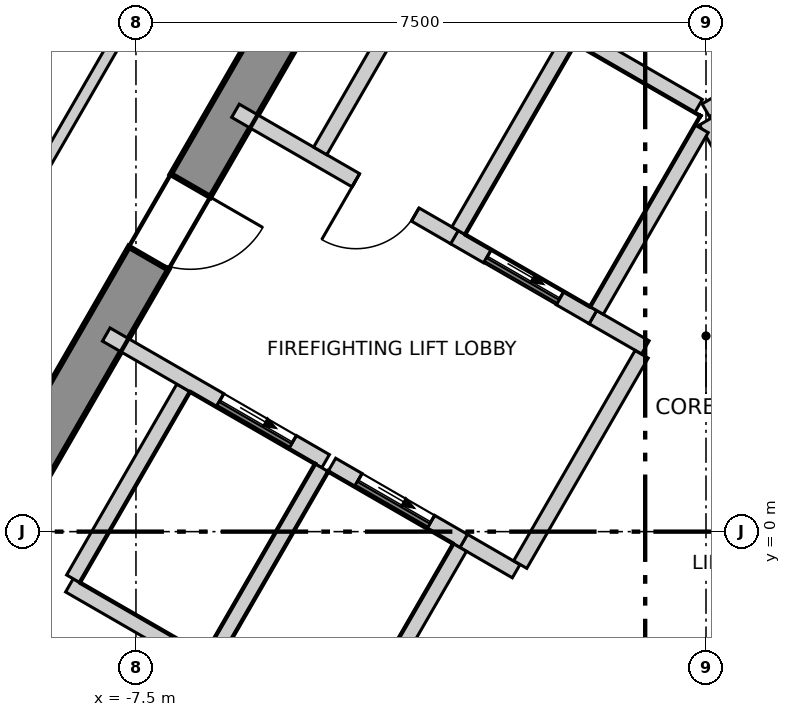
"""IFC4 building model, lengths in metres.
Left out: names, types, materials, properties, quantities, classifications, styles, units other than length and angle.
Written with IfcOpenShell. Run it as: python <this file> out.ifc"""

import sys

from ifc_helpers import new_model, si_unit, direction, frame, frame_2d, origin, place, context, subcontext, project, spatial, polyline, rectangle, outline, extrude, element, fill, save


model = new_model("IFC4")
c1 = context("Model", 3, precision=1e-05, world=origin(), true_north=direction((0.0, 1.0)))
c2 = subcontext(c1, "Body", "Model", "MODEL_VIEW")
j1 = project(units=[si_unit("LENGTHUNIT", "METRE"), si_unit("PLANEANGLEUNIT", "RADIAN")], contexts=[c1])
p1 = place(None, origin())
s1 = spatial("IfcSite", under=j1, at=p1, CompositionType="ELEMENT")
p2 = place(p1, origin())
s2 = spatial("IfcBuilding", under=s1, at=p2, CompositionType="ELEMENT")
p3 = place(p2, frame((0.0, 0.0, 261.8)))
s3 = spatial("IfcBuildingStorey", under=s2, at=p3, CompositionType="ELEMENT", Elevation=261.8)
p4 = place(p3, frame((-1.732, 13.3, -0.3), z_axis=(0.0, 0.0, 1.0), x_axis=(-0.500000539815, -0.866025092122, 0.0)))
e1 = element("IfcWall", 1, at=p4, inside=s3, PredefinedType="SHEAR", context=c2, shape_type="SweptSolid", body=[
    extrude(outline(polyline([(-0.173, -0.3), (1.795, -0.3), (3.763, -0.3), (5.732, -0.3), (7.7, -0.3), (9.668, -0.301), (11.637, -0.301), (13.605, -0.301), (15.573, -0.301), (17.542, -0.301), (19.51, -0.301), (21.478, -0.301), (21.131, 0.3), (19.226, 0.3), (17.321, 0.3), (15.415, 0.3), (13.51, 0.3), (11.605, 0.3), (9.699, 0.3), (7.794, 0.3), (5.889, 0.3), (3.984, 0.3), (2.078, 0.3), (0.173, 0.3), (-0.173, -0.3)])), origin(), (0.0, 0.0, 1.0), 6.5),
])
p5 = place(p4, frame((10.102, 0.0, 0.3)))
e2 = element("IfcOpeningElement", 2, at=p5, cuts=e1, PredefinedType="OPENING", context=c2, shape_type="SweptSolid", body=[
    extrude(rectangle(XDim=1.1, YDim=2.1, at=frame_2d((0.55, 1.05))), frame((0.0, 0.31, 0.0), z_axis=(0.0, -1.0, 0.0), x_axis=(1.0, 0.0, 0.0)), (0.0, 0.0, 1.0), 0.621),
])
p6 = place(p4, frame((16.248, 0.0, 0.3)))
e3 = element("IfcOpeningElement", 3, at=p6, cuts=e1, PredefinedType="OPENING", context=c2, shape_type="SweptSolid", body=[
    extrude(rectangle(XDim=0.9, YDim=2.1, at=frame_2d((0.45, 1.05))), frame((0.0, 0.31, 0.0), z_axis=(0.0, -1.0, 0.0), x_axis=(1.0, 0.0, 0.0)), (0.0, 0.0, 1.0), 0.621),
])
p7 = place(p3, frame((-14.463, -5.15, 0.0), z_axis=(0.0, 0.0, 1.0), x_axis=(0.500017691629, 0.866015189277, 0.0)))
e4 = element("IfcWall", 4, at=p7, inside=s3, PredefinedType="PARTITIONING", context=c2, shape_type="SweptSolid", body=[
    extrude(rectangle(XDim=23.383, YDim=0.15, at=frame_2d((11.691, 0.0))), origin(), (0.0, 0.0, 1.0), 6.2),
])
p8 = place(p7, frame((17.037, 0.0, 0.0)))
e5 = element("IfcOpeningElement", 5, at=p8, cuts=e4, PredefinedType="OPENING", context=c2, shape_type="SweptSolid", body=[
    extrude(rectangle(XDim=1.0, YDim=2.1, at=frame_2d((0.5, 1.05))), frame((0.0, 0.085, 0.0), z_axis=(0.0, -1.0, 0.0), x_axis=(1.0, 0.0, 0.0)), (0.0, 0.0, 1.0), 0.17),
])
p9 = place(p7, frame((5.346, 0.0, 0.0)))
e6 = element("IfcOpeningElement", 6, at=p9, cuts=e4, PredefinedType="OPENING", context=c2, shape_type="SweptSolid", body=[
    extrude(rectangle(XDim=1.0, YDim=2.1, at=frame_2d((0.5, 1.05))), frame((0.0, 0.085, 0.0), z_axis=(0.0, -1.0, 0.0), x_axis=(1.0, 0.0, 0.0)), (0.0, 0.0, 1.0), 0.17),
])
p10 = place(p3, frame((-19.571, -8.798, 0.0), z_axis=(0.0, 0.0, 1.0), x_axis=(0.500014166641, 0.866017224516, 0.0)))
e7 = element("IfcWall", 7, at=p10, inside=s3, PredefinedType="PARTITIONING", context=c2, shape_type="SweptSolid", body=[
    extrude(rectangle(XDim=34.991, YDim=0.15, at=frame_2d((17.496, 0.0))), origin(), (0.0, 0.0, 1.0), 6.2),
])
p11 = place(p3, frame((-23.25, -10.317, 0.0), z_axis=(0.0, 0.0, 1.0), x_axis=(0.500024875003, 0.866011041719, 0.0)))
e8 = element("IfcWall", 8, at=p11, inside=s3, PredefinedType="PARTITIONING", context=c2, shape_type="SweptSolid", body=[
    extrude(rectangle(XDim=41.206, YDim=0.15, at=frame_2d((20.603, 0.0))), origin(), (0.0, 0.0, 1.0), 6.2),
])
p12 = place(p3, frame((-8.376, -0.707, 0.0), z_axis=(0.0, 0.0, 1.0), x_axis=(0.866072678707, -0.499918108492, 0.0)))
e9 = element("IfcWall", 9, at=p12, inside=s3, PredefinedType="SOLIDWALL", context=c2, shape_type="SweptSolid", body=[
    extrude(rectangle(XDim=1.98, YDim=0.2, at=frame_2d((0.99, 0.0))), origin(), (0.0, 0.0, 1.0), 6.2),
])
p13 = place(p3, frame((-8.326, -0.62, 0.0), z_axis=(0.0, 0.0, 1.0), x_axis=(0.500023687443, 0.866011727401, 0.0)))
e10 = element("IfcWall", 10, at=p13, inside=s3, PredefinedType="SOLIDWALL", context=c2, shape_type="SweptSolid", body=[
    extrude(rectangle(XDim=2.9, YDim=0.2, at=frame_2d((1.45, 0.0))), origin(), (0.0, 0.0, 1.0), 6.2),
])
p14 = place(p3, frame((-0.002, 5.541, 0.0), z_axis=(0.0, 0.0, 1.0), x_axis=(0.86600155993, 0.500041296494, 0.0)))
e11 = element("IfcWall", 11, at=p14, inside=s3, PredefinedType="SOLIDWALL", context=c2, shape_type="SweptSolid", body=[
    extrude(rectangle(XDim=4.132, YDim=0.2, at=frame_2d((2.066, 0.0))), origin(), (0.0, 0.0, 1.0), 6.2),
])
p15 = place(p3, frame((0.0, 5.4, 0.0), z_axis=(0.0, 0.0, 1.0), x_axis=(0.500103862429, -0.865965430478, 0.0)))
e12 = element("IfcWall", 12, at=p15, inside=s3, PredefinedType="SOLIDWALL", context=c2, shape_type="SweptSolid", body=[
    extrude(rectangle(XDim=2.973, YDim=0.2, at=frame_2d((1.487, 0.0))), origin(), (0.0, 0.0, 1.0), 6.2),
])
p16 = place(p15, frame((0.937, 0.0, 0.0)))
e13 = element("IfcOpeningElement", 13, at=p16, cuts=e12, PredefinedType="OPENING", context=c2, shape_type="SweptSolid", body=[
    extrude(rectangle(XDim=1.1, YDim=2.1, at=frame_2d((0.55, 1.05))), frame((0.0, 0.11, 0.0), z_axis=(0.0, -1.0, 0.0), x_axis=(1.0, 0.0, 0.0)), (0.0, 0.0, 1.0), 0.22),
])
p17 = place(p3, frame((-7.891, 2.593, 0.0), z_axis=(0.0, 0.0, 1.0), x_axis=(0.866070917804, -0.499921159118, 0.0)))
e14 = element("IfcWall", 14, at=p17, inside=s3, PredefinedType="SOLIDWALL", context=c2, shape_type="SweptSolid", body=[
    extrude(rectangle(XDim=3.333, YDim=0.2, at=frame_2d((1.666, 0.0))), origin(), (0.0, 0.0, 1.0), 6.2),
])
p18 = place(p17, frame((1.73, 0.0, 0.0)))
e15 = element("IfcOpeningElement", 15, at=p18, cuts=e14, PredefinedType="OPENING", context=c2, shape_type="SweptSolid", body=[
    extrude(rectangle(XDim=1.1, YDim=2.1, at=frame_2d((0.55, 1.05))), frame((0.0, 0.11, 0.0), z_axis=(0.0, -1.0, 0.0), x_axis=(1.0, 0.0, 0.0)), (0.0, 0.0, 1.0), 0.22),
])
p19 = place(p3, frame((-3.188, -0.122, 0.0), z_axis=(0.0, 0.0, 1.0), x_axis=(0.865705793592, -0.50055317294, 0.0)))
e16 = element("IfcWall", 16, at=p19, inside=s3, PredefinedType="SOLIDWALL", context=c2, shape_type="SweptSolid", body=[
    extrude(rectangle(XDim=0.797, YDim=0.2, at=frame_2d((0.398, 0.0))), origin(), (0.0, 0.0, 1.0), 6.2),
])
p20 = place(p3, frame((-6.191, 5.537, 0.0), z_axis=(0.0, 0.0, 1.0), x_axis=(0.866052607023, -0.499952879648, 0.0)))
e17 = element("IfcWall", 17, at=p20, inside=s3, PredefinedType="SOLIDWALL", context=c2, shape_type="SweptSolid", body=[
    extrude(rectangle(XDim=3.332, YDim=0.2, at=frame_2d((1.666, 0.0))), origin(), (0.0, 0.0, 1.0), 6.2),
])
p21 = place(p20, frame((1.83, 0.0, 0.0)))
e18 = element("IfcOpeningElement", 18, at=p21, cuts=e17, PredefinedType="OPENING", context=c2, shape_type="SweptSolid", body=[
    extrude(rectangle(XDim=0.9, YDim=2.1, at=frame_2d((0.45, 1.05))), frame((0.0, 0.11, 0.0), z_axis=(0.0, -1.0, 0.0), x_axis=(1.0, 0.0, 0.0)), (0.0, 0.0, 1.0), 0.22),
])
p22 = place(p3, frame((-1.488, 2.822, 0.0), z_axis=(0.0, 0.0, 1.0), x_axis=(0.866236612152, -0.499633997809, 0.0)))
e19 = element("IfcWall", 19, at=p22, inside=s3, PredefinedType="SOLIDWALL", context=c2, shape_type="SweptSolid", body=[
    extrude(rectangle(XDim=0.796, YDim=0.2, at=frame_2d((0.398, 0.0))), origin(), (0.0, 0.0, 1.0), 6.2),
])
p23 = place(p3, frame((-5.076, 5.009, 0.0), z_axis=(0.0, 0.0, 1.0), x_axis=(0.50002537861, 0.866010750942, 0.0)))
e20 = element("IfcWall", 20, at=p23, inside=s3, PredefinedType="SOLIDWALL", context=c2, shape_type="SweptSolid", body=[
    extrude(rectangle(XDim=3.0, YDim=0.2, at=frame_2d((1.5, 0.0))), origin(), (0.0, 0.0, 1.0), 6.2),
])
p24 = place(p3, frame((-2.444, -0.433, 0.0), z_axis=(0.0, 0.0, 1.0), x_axis=(0.500035624827, 0.866004834804, 0.0)))
e21 = element("IfcWall", 21, at=p24, inside=s3, PredefinedType="SOLIDWALL", context=c2, shape_type="SweptSolid", body=[
    extrude(rectangle(XDim=3.194, YDim=0.2, at=frame_2d((1.597, 0.0))), origin(), (0.0, 0.0, 1.0), 6.2),
])
p25 = place(p3, frame((-6.557, -1.757, 0.0), z_axis=(0.0, 0.0, 1.0), x_axis=(0.499990139034, 0.866031096941, 0.0)))
e22 = element("IfcWall", 22, at=p25, inside=s3, PredefinedType="SOLIDWALL", context=c2, shape_type="SweptSolid", body=[
    extrude(rectangle(XDim=3.0, YDim=0.2, at=frame_2d((1.5, 0.0))), origin(), (0.0, 0.0, 1.0), 6.2),
])
p26 = place(p3, frame((-4.922, 0.879, 0.0), z_axis=(0.0, 0.0, 1.0), x_axis=(0.866073918653, -0.499915960366, 0.0)))
e23 = element("IfcWall", 23, at=p26, inside=s3, PredefinedType="SOLIDWALL", context=c2, shape_type="SweptSolid", body=[
    extrude(rectangle(XDim=2.002, YDim=0.2, at=frame_2d((1.001, 0.0))), origin(), (0.0, 0.0, 1.0), 6.2),
])
p27 = place(p26, frame((0.402, 0.0, 0.0)))
e24 = element("IfcOpeningElement", 24, at=p27, cuts=e23, PredefinedType="OPENING", context=c2, shape_type="SweptSolid", body=[
    extrude(rectangle(XDim=1.1, YDim=2.1, at=frame_2d((0.55, 1.05))), frame((0.0, 0.11, 0.0), z_axis=(0.0, -1.0, 0.0), x_axis=(1.0, 0.0, 0.0)), (0.0, 0.0, 1.0), 0.22),
])
p28 = place(p3, frame((-4.619, -2.6, 0.0), z_axis=(0.0, 0.0, 1.0), x_axis=(0.50009492287, 0.865970593103, 0.0)))
e25 = element("IfcWall", 25, at=p28, inside=s3, PredefinedType="SOLIDWALL", context=c2, shape_type="SweptSolid", body=[
    extrude(rectangle(XDim=2.761, YDim=0.2, at=frame_2d((1.381, 0.0))), origin(), (0.0, 0.0, 1.0), 6.2),
])
p29 = place(p3, frame((-3.309, 3.873, 0.0), z_axis=(0.0, 0.0, 1.0), x_axis=(0.866098583652, -0.499873227325, 0.0)))
e26 = element("IfcWall", 26, at=p29, inside=s3, PredefinedType="SOLIDWALL", context=c2, shape_type="SweptSolid", body=[
    extrude(rectangle(XDim=2.103, YDim=0.2, at=frame_2d((1.051, 0.0))), origin(), (0.0, 0.0, 1.0), 6.2),
])
p30 = place(p29, frame((0.502, 0.0, 0.0)))
e27 = element("IfcOpeningElement", 27, at=p30, cuts=e26, PredefinedType="OPENING", context=c2, shape_type="SweptSolid", body=[
    extrude(rectangle(XDim=1.1, YDim=2.1, at=frame_2d((0.55, 1.05))), frame((0.0, 0.11, 0.0), z_axis=(0.0, -1.0, 0.0), x_axis=(1.0, 0.0, 0.0)), (0.0, 0.0, 1.0), 0.22),
])
p31 = place(p3, frame((-3.257, 3.959, 0.0), z_axis=(0.0, 0.0, 1.0), x_axis=(0.50012328804, 0.865954211699, 0.0)))
e28 = element("IfcWall", 28, at=p31, inside=s3, PredefinedType="SOLIDWALL", context=c2, shape_type="SweptSolid", body=[
    extrude(rectangle(XDim=2.9, YDim=0.2, at=frame_2d((1.45, 0.0))), origin(), (0.0, 0.0, 1.0), 6.2),
])
p32 = place(p3, frame((-1.67, 6.507, 0.0), z_axis=(0.0, 0.0, 1.0), x_axis=(0.865941441609, -0.500145398563, 0.0)))
e29 = element("IfcWall", 29, at=p32, inside=s3, PredefinedType="SOLIDWALL", context=c2, shape_type="SweptSolid", body=[
    extrude(rectangle(XDim=1.815, YDim=0.2, at=frame_2d((0.908, 0.0))), origin(), (0.0, 0.0, 1.0), 6.2),
])
p33 = place(p3, frame((-1.438, 2.909, 0.0), z_axis=(0.0, 0.0, 1.0), x_axis=(0.499829630636, 0.866123744241, 0.0)))
e30 = element("IfcWall", 30, at=p33, inside=s3, PredefinedType="SOLIDWALL", context=c2, shape_type="SweptSolid", body=[
    extrude(rectangle(XDim=2.761, YDim=0.2, at=frame_2d((1.38, 0.0))), origin(), (0.0, 0.0, 1.0), 6.2),
])
p34 = place(p27, origin())
e31 = element("IfcDoor", 31, at=p34, inside=s3, OperationType="SLIDING_TO_LEFT", PredefinedType="DOOR", context=c2, shape_type="SweptSolid", body=[
    extrude(rectangle(XDim=1.1, YDim=2.1, at=frame_2d((0.55, 1.05))), frame((0.0, 0.025, 0.0), z_axis=(0.0, -1.0, 0.0), x_axis=(1.0, 0.0, 0.0)), (0.0, 0.0, 1.0), 0.05),
])
fill(e24, e31)
p35 = place(p30, origin())
e32 = element("IfcDoor", 32, at=p35, inside=s3, OperationType="SLIDING_TO_LEFT", PredefinedType="DOOR", context=c2, shape_type="SweptSolid", body=[
    extrude(rectangle(XDim=1.1, YDim=2.1, at=frame_2d((0.55, 1.05))), frame((0.0, 0.025, 0.0), z_axis=(0.0, -1.0, 0.0), x_axis=(1.0, 0.0, 0.0)), (0.0, 0.0, 1.0), 0.05),
])
fill(e27, e32)
p36 = place(p18, origin())
e33 = element("IfcDoor", 33, at=p36, inside=s3, OperationType="SLIDING_TO_LEFT", PredefinedType="DOOR", context=c2, shape_type="SweptSolid", body=[
    extrude(rectangle(XDim=1.1, YDim=2.1, at=frame_2d((0.55, 1.05))), frame((0.0, 0.025, 0.0), z_axis=(0.0, -1.0, 0.0), x_axis=(1.0, 0.0, 0.0)), (0.0, 0.0, 1.0), 0.05),
])
fill(e15, e33)
p37 = place(p21, origin())
e34 = element("IfcDoor", 34, at=p37, inside=s3, OperationType="SINGLE_SWING_LEFT", PredefinedType="DOOR", context=c2, shape_type="SweptSolid", body=[
    extrude(rectangle(XDim=0.9, YDim=2.1, at=frame_2d((0.45, 1.05))), frame((0.0, 0.025, 0.0), z_axis=(0.0, -1.0, 0.0), x_axis=(1.0, 0.0, 0.0)), (0.0, 0.0, 1.0), 0.05),
])
fill(e18, e34)
p38 = place(p5, origin())
e35 = element("IfcDoor", 35, at=p38, inside=s3, OperationType="SINGLE_SWING_RIGHT", PredefinedType="DOOR", context=c2, shape_type="SweptSolid", body=[
    extrude(rectangle(XDim=1.1, YDim=2.1, at=frame_2d((0.55, 1.05))), frame((0.0, 0.025, 0.0), z_axis=(0.0, -1.0, 0.0), x_axis=(1.0, 0.0, 0.0)), (0.0, 0.0, 1.0), 0.05),
])
fill(e2, e35)
save(model, sys.argv[1])
